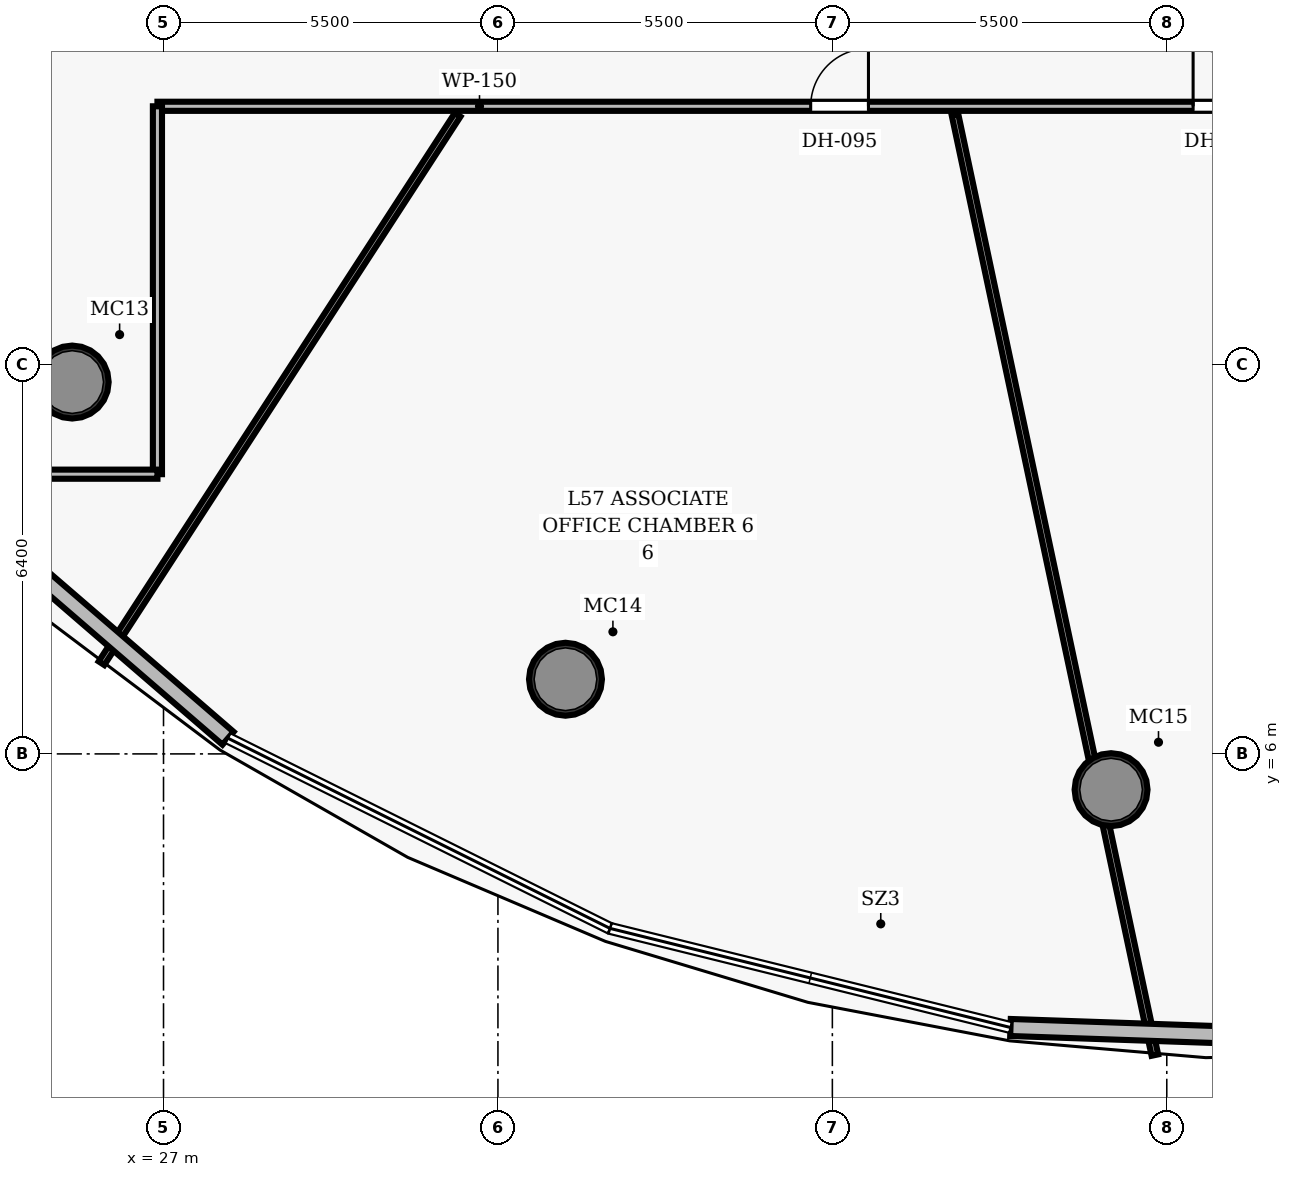
"""IFC4 building model, lengths in metres.
Left out: names, types, materials, properties, quantities, classifications, styles, units other than length and angle.
Written with IfcOpenShell. Run it as: python <this file> out.ifc"""

import sys

from ifc_helpers import new_model, si_unit, direction, frame, frame_2d, origin, origin_2d, place, context, subcontext, project, spatial, rectangle, hollow_circle, extrude, element, fill, save


model = new_model("IFC4")
c1 = context("Model", 3, precision=1e-05, world=origin(), true_north=direction((0.0, 1.0)))
c2 = subcontext(c1, "Body", "Model", "MODEL_VIEW")
j1 = project(units=[si_unit("LENGTHUNIT", "METRE"), si_unit("PLANEANGLEUNIT", "RADIAN")], contexts=[c1])
p1 = place(None, origin())
s1 = spatial("IfcSite", under=j1, at=p1, CompositionType="ELEMENT")
p2 = place(p1, origin())
s2 = spatial("IfcBuilding", under=s1, at=p2, CompositionType="ELEMENT")
p3 = place(p2, frame((0.0, 0.0, 225.1)))
s3 = spatial("IfcBuildingStorey", under=s2, at=p3, CompositionType="ELEMENT", Elevation=225.1)
for number, where, z_axis, x_axis in (
    (1, (25.498, 12.115, 0.0), (0.0, 0.0, 1.0), (1.0, 0.0, 0.0)),
    (2, (33.611, 7.228, 0.0), (0.0, 0.0, 1.0), (1.0, 0.0, 0.0)),
    (3, (42.584, 5.412, 0.0), (0.0, 0.0, 1.0), (1.0, 0.0, 0.0)),
):
    element("IfcColumn", number, at=place(p3, frame(where, z_axis=z_axis, x_axis=x_axis)), inside=s3, PredefinedType="COLUMN", context=c2, shape_type="SweptSolid", body=[
        extrude(hollow_circle(Radius=0.6, WallThickness=0.05, at=origin_2d()), origin(), (0.0, 0.0, 1.0), 3.85),
    ])
p4 = place(p3, frame((26.9, 16.65, 0.0), z_axis=(0.0, 0.0, 1.0), x_axis=(1.0, 0.0, 0.0)))
e4 = element("IfcWall", 4, at=p4, inside=s3, PredefinedType="PARTITIONING", context=c2, shape_type="SweptSolid", body=[
    extrude(rectangle(XDim=22.2, YDim=0.15, at=frame_2d((11.1, 0.0))), origin(), (0.0, 0.0, 1.0), 3.035),
])
p5 = place(p4, frame((10.744, 0.0, 0.0)))
e5 = element("IfcOpeningElement", 5, at=p5, cuts=e4, PredefinedType="OPENING", context=c2, shape_type="SweptSolid", body=[
    extrude(rectangle(XDim=0.95, YDim=2.15, at=frame_2d((0.475, 1.075))), frame((0.0, 0.085, 0.0), z_axis=(0.0, -1.0, 0.0), x_axis=(1.0, 0.0, 0.0)), (0.0, 0.0, 1.0), 0.17),
])
p6 = place(p4, frame((17.033, 0.0, 0.0)))
e6 = element("IfcOpeningElement", 6, at=p6, cuts=e4, PredefinedType="OPENING", context=c2, shape_type="SweptSolid", body=[
    extrude(rectangle(XDim=0.95, YDim=2.15, at=frame_2d((0.475, 1.075))), frame((0.0, 0.085, 0.0), z_axis=(0.0, -1.0, 0.0), x_axis=(1.0, 0.0, 0.0)), (0.0, 0.0, 1.0), 0.17),
])
p7 = place(p3, frame((26.9, 10.6, 0.0), z_axis=(0.0, 0.0, 1.0), x_axis=(0.0, 1.0, 0.0)))
e7 = element("IfcWall", 7, at=p7, inside=s3, PredefinedType="PARTITIONING", context=c2, shape_type="SweptSolid", body=[
    extrude(rectangle(XDim=6.05, YDim=0.15, at=frame_2d((3.025, 0.0))), origin(), (0.0, 0.0, 1.0), 3.035),
])
p8 = place(p3, frame((24.8, 10.6, 0.0), z_axis=(0.0, 0.0, 1.0), x_axis=(1.0, 0.0, 0.0)))
e8 = element("IfcWall", 8, at=p8, inside=s3, PredefinedType="PARTITIONING", context=c2, shape_type="SweptSolid", body=[
    extrude(rectangle(XDim=2.1, YDim=0.15, at=frame_2d((1.05, 0.0))), origin(), (0.0, 0.0, 1.0), 3.035),
])
p9 = place(p3, frame((31.837, 16.51, 0.0), z_axis=(0.0, 0.0, 1.0), x_axis=(-0.544642773232, -0.838668140307, 0.0)))
e9 = element("IfcWall", 9, at=p9, inside=s3, PredefinedType="PARTITIONING", context=c2, shape_type="SweptSolid", body=[
    extrude(rectangle(XDim=10.754, YDim=0.11, at=frame_2d((5.377, 0.0))), origin(), (0.0, 0.0, 1.0), 3.035),
])
p10 = place(p3, frame((40.017, 16.51, 0.0), z_axis=(0.0, 0.0, 1.0), x_axis=(0.207916198269, -0.978146642635, 0.0)))
e10 = element("IfcWall", 10, at=p10, inside=s3, PredefinedType="PARTITIONING", context=c2, shape_type="SweptSolid", body=[
    extrude(rectangle(XDim=15.809, YDim=0.11, at=frame_2d((7.904, 0.0))), origin(), (0.0, 0.0, 1.0), 3.035),
])
p11 = place(p3, frame((28.061, 6.257, 0.0), z_axis=(0.0, 0.0, 1.0), x_axis=(-0.75694766073, 0.65347550751, 0.0)))
e11 = element("IfcWall", 11, at=p11, inside=s3, PredefinedType="SOLIDWALL", context=c2, shape_type="SweptSolid", body=[
    extrude(rectangle(XDim=7.045, YDim=0.28, at=frame_2d((3.523, 0.0))), origin(), (0.0, 0.0, 1.0), 3.62),
])
p12 = place(p3, frame((47.152, 1.287, 0.0), z_axis=(0.0, 0.0, 1.0), x_axis=(-0.999408557878, 0.03438799848, 0.0)))
e12 = element("IfcWall", 12, at=p12, inside=s3, PredefinedType="SOLIDWALL", context=c2, shape_type="SweptSolid", body=[
    extrude(rectangle(XDim=6.226, YDim=0.28, at=frame_2d((3.113, 0.0))), origin(), (0.0, 0.0, 1.0), 3.62),
])
p13 = place(p5, origin())
e13 = element("IfcDoor", 13, at=p13, inside=s3, OperationType="SINGLE_SWING_RIGHT", PredefinedType="DOOR", context=c2, shape_type="SweptSolid", body=[
    extrude(rectangle(XDim=0.95, YDim=2.15, at=frame_2d((0.475, 1.075))), frame((0.0, 0.025, 0.0), z_axis=(0.0, -1.0, 0.0), x_axis=(1.0, 0.0, 0.0)), (0.0, 0.0, 1.0), 0.05),
])
fill(e5, e13)
p14 = place(p6, origin())
e14 = element("IfcDoor", 14, at=p14, inside=s3, OperationType="SINGLE_SWING_LEFT", PredefinedType="DOOR", context=c2, shape_type="SweptSolid", body=[
    extrude(rectangle(XDim=0.95, YDim=2.15, at=frame_2d((0.475, 1.075))), frame((0.0, 0.025, 0.0), z_axis=(0.0, -1.0, 0.0), x_axis=(1.0, 0.0, 0.0)), (0.0, 0.0, 1.0), 0.05),
])
fill(e6, e14)
save(model, sys.argv[1])
